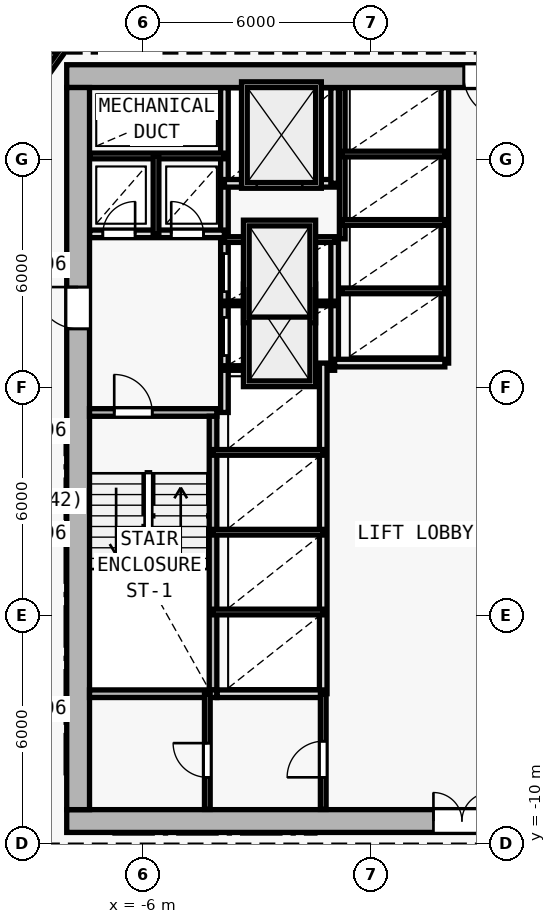
"""IFC4 building model, lengths in metres.
Left out: names, types, materials, properties, quantities, classifications, styles, units other than length and angle.
Written with IfcOpenShell. Run it as: python <this file> out.ifc"""

import sys

from ifc_helpers import new_model, si_unit, direction, frame, frame_2d, origin, origin_2d, place, context, subcontext, project, spatial, rectangle, i_section, extrude, element, fill, save


model = new_model("IFC4")
c1 = context("Model", 3, precision=1e-05, world=origin(), true_north=direction((0.0, 1.0)))
c2 = subcontext(c1, "Body", "Model", "MODEL_VIEW")
j1 = project(units=[si_unit("LENGTHUNIT", "METRE"), si_unit("PLANEANGLEUNIT", "RADIAN")], contexts=[c1])
p1 = place(None, origin())
s1 = spatial("IfcSite", under=j1, at=p1, CompositionType="ELEMENT")
p2 = place(p1, origin())
s2 = spatial("IfcBuilding", under=s1, at=p2, CompositionType="ELEMENT")
p3 = place(p2, frame((0.0, 0.0, 33.6)))
s3 = spatial("IfcBuildingStorey", under=s2, at=p3, CompositionType="ELEMENT", Elevation=33.6)
for number, where, z_axis, x_axis in (
    (1, (-7.7, -9.4, 0.0), (0.0, 0.0, 1.0), (1.0, 0.0, 0.0)),
    (2, (-7.7, 10.2, 0.0), (0.0, 0.0, 1.0), (1.0, 0.0, 0.0)),
    (3, (0.0, -9.4, 0.0), (0.0, 0.0, 1.0), (1.0, 0.0, 0.0)),
    (4, (-7.7, 2.0, 0.0), (0.0, 0.0, 1.0), (1.0, 0.0, 0.0)),
):
    element("IfcColumn", number, at=place(p3, frame(where, z_axis=z_axis, x_axis=x_axis)), inside=s3, PredefinedType="COLUMN", context=c2, shape_type="SweptSolid", body=[
        extrude(i_section(OverallWidth=0.416, OverallDepth=0.446, WebThickness=0.025, FlangeThickness=0.04, FilletRadius=0.015, at=origin_2d()), origin(), (0.0, 0.0, 1.0), 3.6),
    ])
p4 = place(p3, frame((-8.0, -9.4, 0.0), z_axis=(0.0, 0.0, 1.0), x_axis=(1.0, 0.0, 0.0)))
e5 = element("IfcWall", 5, at=p4, inside=s3, PredefinedType="SHEAR", context=c2, shape_type="SweptSolid", body=[
    extrude(rectangle(XDim=16.0, YDim=0.6, at=frame_2d((8.0, 0.0))), origin(), (0.0, 0.0, 1.0), 3.35),
])
p5 = place(p4, frame((9.65, 0.0, 0.0)))
e6 = element("IfcOpeningElement", 6, at=p5, cuts=e5, PredefinedType="OPENING", context=c2, shape_type="SweptSolid", body=[
    extrude(rectangle(XDim=1.5, YDim=2.2, at=frame_2d((0.75, 1.1))), frame((0.0, 0.31, 0.0), z_axis=(0.0, -1.0, 0.0), x_axis=(1.0, 0.0, 0.0)), (0.0, 0.0, 1.0), 0.62),
])
p6 = place(p3, frame((8.0, 10.2, 0.0), z_axis=(0.0, 0.0, 1.0), x_axis=(-1.0, 0.0, 0.0)))
e7 = element("IfcWall", 7, at=p6, inside=s3, PredefinedType="SHEAR", context=c2, shape_type="SweptSolid", body=[
    extrude(rectangle(XDim=16.0, YDim=0.6, at=frame_2d((8.0, 0.0))), origin(), (0.0, 0.0, 1.0), 3.35),
])
p7 = place(p6, frame((4.45, 0.0, 0.0)))
e8 = element("IfcOpeningElement", 8, at=p7, cuts=e7, PredefinedType="OPENING", context=c2, shape_type="SweptSolid", body=[
    extrude(rectangle(XDim=1.1, YDim=2.15, at=frame_2d((0.55, 1.075))), frame((0.0, 0.31, 0.0), z_axis=(0.0, -1.0, 0.0), x_axis=(1.0, 0.0, 0.0)), (0.0, 0.0, 1.0), 0.62),
])
p8 = place(p3, frame((-7.7, -9.1, 0.0), z_axis=(0.0, 0.0, 1.0), x_axis=(0.0, 1.0, 0.0)))
e9 = element("IfcWall", 9, at=p8, inside=s3, PredefinedType="SHEAR", context=c2, shape_type="SweptSolid", body=[
    extrude(rectangle(XDim=19.0, YDim=0.6, at=frame_2d((9.5, 0.0))), origin(), (0.0, 0.0, 1.0), 3.35),
])
p9 = place(p8, frame((12.65, 0.0, 0.0)))
e10 = element("IfcOpeningElement", 10, at=p9, cuts=e9, PredefinedType="OPENING", context=c2, shape_type="SweptSolid", body=[
    extrude(rectangle(XDim=1.1, YDim=2.15, at=frame_2d((0.55, 1.075))), frame((0.0, 0.31, 0.0), z_axis=(0.0, -1.0, 0.0), x_axis=(1.0, 0.0, 0.0)), (0.0, 0.0, 1.0), 0.62),
])
p10 = place(p3, frame((-7.4, 1.35, 0.0), z_axis=(0.0, 0.0, 1.0), x_axis=(1.0, 0.0, 0.0)))
e11 = element("IfcWall", 11, at=p10, inside=s3, PredefinedType="SOLIDWALL", context=c2, shape_type="SweptSolid", body=[
    extrude(rectangle(XDim=3.35, YDim=0.2, at=frame_2d((1.675, 0.0))), origin(), (0.0, 0.0, 1.0), 3.35),
])
p11 = place(p10, frame((0.65, 0.0, 0.0)))
e12 = element("IfcOpeningElement", 12, at=p11, cuts=e11, PredefinedType="OPENING", context=c2, shape_type="SweptSolid", body=[
    extrude(rectangle(XDim=1.0, YDim=2.15, at=frame_2d((0.5, 1.075))), frame((0.0, 0.11, 0.0), z_axis=(0.0, -1.0, 0.0), x_axis=(1.0, 0.0, 0.0)), (0.0, 0.0, 1.0), 0.22),
])
p12 = place(p3, frame((-4.15, -5.95, 0.0), z_axis=(0.0, 0.0, 1.0), x_axis=(0.0, 1.0, 0.0)))
e13 = element("IfcWall", 13, at=p12, inside=s3, PredefinedType="SOLIDWALL", context=c2, shape_type="SweptSolid", body=[
    extrude(rectangle(XDim=7.2, YDim=0.2, at=frame_2d((3.6, 0.0))), origin(), (0.0, 0.0, 1.0), 3.35),
])
p13 = place(p3, frame((-3.85, 1.35, 0.0), z_axis=(0.0, 0.0, 1.0), x_axis=(0.0, 1.0, 0.0)))
e14 = element("IfcWall", 14, at=p13, inside=s3, PredefinedType="SOLIDWALL", context=c2, shape_type="SweptSolid", body=[
    extrude(rectangle(XDim=8.545, YDim=0.2, at=frame_2d((4.272, 0.0))), origin(), (0.0, 0.0, 1.0), 3.35),
])
p14 = place(p13, frame((1.5, 0.0, 0.0)))
e15 = element("IfcOpeningElement", 15, at=p14, cuts=e14, PredefinedType="OPENING", context=c2, shape_type="SweptSolid", body=[
    extrude(rectangle(XDim=1.0, YDim=2.15, at=frame_2d((0.5, 1.075))), frame((0.0, 0.11, 0.0), z_axis=(0.0, -1.0, 0.0), x_axis=(1.0, 0.0, 0.0)), (0.0, 0.0, 1.0), 0.22),
])
p15 = place(p13, frame((3.18, 0.0, 0.0)))
e16 = element("IfcOpeningElement", 16, at=p15, cuts=e14, PredefinedType="OPENING", context=c2, shape_type="SweptSolid", body=[
    extrude(rectangle(XDim=1.0, YDim=2.15, at=frame_2d((0.5, 1.075))), frame((0.0, 0.11, 0.0), z_axis=(0.0, -1.0, 0.0), x_axis=(1.0, 0.0, 0.0)), (0.0, 0.0, 1.0), 0.22),
])
p16 = place(p3, frame((-7.395, 6.05, 0.0), z_axis=(0.0, 0.0, 1.0), x_axis=(1.0, 0.0, 0.0)))
e17 = element("IfcWall", 17, at=p16, inside=s3, PredefinedType="SOLIDWALL", context=c2, shape_type="SweptSolid", body=[
    extrude(rectangle(XDim=3.545, YDim=0.2, at=frame_2d((1.772, 0.0))), origin(), (0.0, 0.0, 1.0), 3.35),
])
p17 = place(p16, frame((0.345, 0.0, 0.0)))
e18 = element("IfcOpeningElement", 18, at=p17, cuts=e17, PredefinedType="OPENING", context=c2, shape_type="SweptSolid", body=[
    extrude(rectangle(XDim=0.85, YDim=2.1, at=frame_2d((0.425, 1.05))), frame((0.0, 0.11, 0.0), z_axis=(0.0, -1.0, 0.0), x_axis=(1.0, 0.0, 0.0)), (0.0, 0.0, 1.0), 0.22),
])
p18 = place(p16, frame((2.145, 0.0, 0.0)))
e19 = element("IfcOpeningElement", 19, at=p18, cuts=e17, PredefinedType="OPENING", context=c2, shape_type="SweptSolid", body=[
    extrude(rectangle(XDim=0.85, YDim=2.1, at=frame_2d((0.425, 1.05))), frame((0.0, 0.11, 0.0), z_axis=(0.0, -1.0, 0.0), x_axis=(1.0, 0.0, 0.0)), (0.0, 0.0, 1.0), 0.22),
])
p19 = place(p3, frame((-7.395, 8.1, 0.0), z_axis=(0.0, 0.0, 1.0), x_axis=(1.0, 0.0, 0.0)))
e20 = element("IfcWall", 20, at=p19, inside=s3, PredefinedType="PARTITIONING", context=c2, shape_type="SweptSolid", body=[
    extrude(rectangle(XDim=3.545, YDim=0.15, at=frame_2d((1.772, 0.0))), origin(), (0.0, 0.0, 1.0), 3.35),
])
p20 = place(p3, frame((-5.65, 6.05, 0.0), z_axis=(0.0, 0.0, 1.0), x_axis=(0.0, 1.0, 0.0)))
e21 = element("IfcWall", 21, at=p20, inside=s3, PredefinedType="PARTITIONING", context=c2, shape_type="SweptSolid", body=[
    extrude(rectangle(XDim=2.05, YDim=0.15, at=frame_2d((1.025, 0.0))), origin(), (0.0, 0.0, 1.0), 3.35),
])
p21 = place(p3, frame((-0.95, 2.65, 0.0), z_axis=(0.0, 0.0, 1.0), x_axis=(0.0, 1.0, 0.0)))
e22 = element("IfcWall", 22, at=p21, inside=s3, PredefinedType="SOLIDWALL", context=c2, shape_type="SweptSolid", body=[
    extrude(rectangle(XDim=3.27, YDim=0.2, at=frame_2d((1.635, 0.0))), origin(), (0.0, 0.0, 1.0), 3.35),
])
for number, where, z_axis, x_axis in (
    (23, (-3.85, 2.52, 0.0), (0.0, 0.0, 1.0), (1.0, 0.0, 0.0)),
    (24, (-3.85, 4.22, 0.0), (0.0, 0.0, 1.0), (1.0, 0.0, 0.0)),
):
    element("IfcWall", number, at=place(p3, frame(where, z_axis=z_axis, x_axis=x_axis)), inside=s3, PredefinedType="PARTITIONING", context=c2, shape_type="SweptSolid", body=[
        extrude(rectangle(XDim=2.9, YDim=0.12, at=frame_2d((1.45, 0.0))), origin(), (0.0, 0.0, 1.0), 3.35),
    ])
p22 = place(p3, frame((-3.85, 5.9, 0.0), z_axis=(0.0, 0.0, 1.0), x_axis=(1.0, 0.0, 0.0)))
e25 = element("IfcWall", 25, at=p22, inside=s3, PredefinedType="PARTITIONING", context=c2, shape_type="SweptSolid", body=[
    extrude(rectangle(XDim=2.9, YDim=0.15, at=frame_2d((1.45, 0.0))), origin(), (0.0, 0.0, 1.0), 3.35),
])
p23 = place(p3, frame((-3.85, 7.38, 0.0), z_axis=(0.0, 0.0, 1.0), x_axis=(1.0, 0.0, 0.0)))
e26 = element("IfcWall", 26, at=p23, inside=s3, PredefinedType="SOLIDWALL", context=c2, shape_type="SweptSolid", body=[
    extrude(rectangle(XDim=2.9, YDim=0.2, at=frame_2d((1.45, 0.0))), origin(), (0.0, 0.0, 1.0), 3.35),
])
p24 = place(p23, frame((0.85, 0.0, 0.0)))
e27 = element("IfcOpeningElement", 27, at=p24, cuts=e26, PredefinedType="OPENING", context=c2, shape_type="SweptSolid", body=[
    extrude(rectangle(XDim=1.2, YDim=2.2, at=frame_2d((0.6, 1.1))), frame((0.0, 0.11, 0.0), z_axis=(0.0, -1.0, 0.0), x_axis=(1.0, 0.0, 0.0)), (0.0, 0.0, 1.0), 0.22),
])
p25 = place(p3, frame((-0.95, 7.38, 0.0), z_axis=(0.0, 0.0, 1.0), x_axis=(0.0, 1.0, 0.0)))
e28 = element("IfcWall", 28, at=p25, inside=s3, PredefinedType="SOLIDWALL", context=c2, shape_type="SweptSolid", body=[
    extrude(rectangle(XDim=2.515, YDim=0.2, at=frame_2d((1.258, 0.0))), origin(), (0.0, 0.0, 1.0), 3.35),
])
p26 = place(p3, frame((-1.25, -6.05, 0.0), z_axis=(0.0, 0.0, 1.0), x_axis=(0.0, 1.0, 0.0)))
e29 = element("IfcWall", 29, at=p26, inside=s3, PredefinedType="SOLIDWALL", context=c2, shape_type="SweptSolid", body=[
    extrude(rectangle(XDim=8.7, YDim=0.2, at=frame_2d((4.35, 0.0))), origin(), (0.0, 0.0, 1.0), 3.35),
])
for number, where, z_axis, x_axis in (
    (30, (-4.15, -3.9, 0.0), (0.0, 0.0, 1.0), (1.0, 0.0, 0.0)),
    (31, (-4.15, -1.8, 0.0), (0.0, 0.0, 1.0), (1.0, 0.0, 0.0)),
    (32, (-4.15, 0.3, 0.0), (0.0, 0.0, 1.0), (1.0, 0.0, 0.0)),
):
    element("IfcWall", number, at=place(p3, frame(where, z_axis=z_axis, x_axis=x_axis)), inside=s3, PredefinedType="PARTITIONING", context=c2, shape_type="SweptSolid", body=[
        extrude(rectangle(XDim=2.9, YDim=0.15, at=frame_2d((1.45, 0.0))), origin(), (0.0, 0.0, 1.0), 3.35),
    ])
p27 = place(p3, frame((1.95, 2.65, 0.0), z_axis=(0.0, 0.0, 1.0), x_axis=(0.0, 1.0, 0.0)))
e33 = element("IfcWall", 33, at=p27, inside=s3, PredefinedType="SOLIDWALL", context=c2, shape_type="SweptSolid", body=[
    extrude(rectangle(XDim=7.245, YDim=0.2, at=frame_2d((3.623, 0.0))), origin(), (0.0, 0.0, 1.0), 3.35),
])
p28 = place(p3, frame((-0.95, 2.65, 0.0), z_axis=(0.0, 0.0, 1.0), x_axis=(1.0, 0.0, 0.0)))
e34 = element("IfcWall", 34, at=p28, inside=s3, PredefinedType="SOLIDWALL", context=c2, shape_type="SweptSolid", body=[
    extrude(rectangle(XDim=2.9, YDim=0.2, at=frame_2d((1.45, 0.0))), origin(), (0.0, 0.0, 1.0), 3.35),
])
p29 = place(p3, frame((-0.75, 5.92, 0.0), z_axis=(0.0, 0.0, 1.0), x_axis=(0.0, 1.0, 0.0)))
e35 = element("IfcWall", 35, at=p29, inside=s3, PredefinedType="PARTITIONING", context=c2, shape_type="SweptSolid", body=[
    extrude(rectangle(XDim=3.975, YDim=0.15, at=frame_2d((1.988, 0.0))), origin(), (0.0, 0.0, 1.0), 3.35),
])
for number, where, z_axis, x_axis in (
    (36, (-0.75, 4.55, 0.0), (0.0, 0.0, 1.0), (1.0, 0.0, 0.0)),
    (37, (-0.75, 6.35, 0.0), (0.0, 0.0, 1.0), (1.0, 0.0, 0.0)),
    (38, (-0.75, 8.15, 0.0), (0.0, 0.0, 1.0), (1.0, 0.0, 0.0)),
):
    element("IfcWall", number, at=place(p3, frame(where, z_axis=z_axis, x_axis=x_axis)), inside=s3, PredefinedType="PARTITIONING", context=c2, shape_type="SweptSolid", body=[
        extrude(rectangle(XDim=2.7, YDim=0.15, at=frame_2d((1.35, 0.0))), origin(), (0.0, 0.0, 1.0), 3.35),
    ])
p30 = place(p3, frame((-7.4, -6.05, 0.0), z_axis=(0.0, 0.0, 1.0), x_axis=(1.0, 0.0, 0.0)))
e39 = element("IfcWall", 39, at=p30, inside=s3, PredefinedType="SOLIDWALL", context=c2, shape_type="SweptSolid", body=[
    extrude(rectangle(XDim=3.35, YDim=0.2, at=frame_2d((1.675, 0.0))), origin(), (0.0, 0.0, 1.0), 3.35),
])
p31 = place(p3, frame((-4.04, -6.05, 0.0), z_axis=(0.0, 0.0, 1.0), x_axis=(1.0, 0.0, 0.0)))
e40 = element("IfcWall", 40, at=p31, inside=s3, PredefinedType="SOLIDWALL", context=c2, shape_type="SweptSolid", body=[
    extrude(rectangle(XDim=2.79, YDim=0.2, at=frame_2d((1.395, 0.0))), origin(), (0.0, 0.0, 1.0), 3.35),
])
p32 = place(p3, frame((-1.25, -9.095, 0.0), z_axis=(0.0, 0.0, 1.0), x_axis=(0.0, 1.0, 0.0)))
e41 = element("IfcWall", 41, at=p32, inside=s3, PredefinedType="PARTITIONING", context=c2, shape_type="SweptSolid", body=[
    extrude(rectangle(XDim=3.045, YDim=0.15, at=frame_2d((1.522, 0.0))), origin(), (0.0, 0.0, 1.0), 3.35),
])
p33 = place(p32, frame((0.845, 0.0, 0.0)))
e42 = element("IfcOpeningElement", 42, at=p33, cuts=e41, PredefinedType="OPENING", context=c2, shape_type="SweptSolid", body=[
    extrude(rectangle(XDim=0.95, YDim=2.1, at=frame_2d((0.475, 1.05))), frame((0.0, 0.085, 0.0), z_axis=(0.0, -1.0, 0.0), x_axis=(1.0, 0.0, 0.0)), (0.0, 0.0, 1.0), 0.17),
])
p34 = place(p3, frame((-4.3, -9.095, 0.0), z_axis=(0.0, 0.0, 1.0), x_axis=(0.0, 1.0, 0.0)))
e43 = element("IfcWall", 43, at=p34, inside=s3, PredefinedType="PARTITIONING", context=c2, shape_type="SweptSolid", body=[
    extrude(rectangle(XDim=3.045, YDim=0.15, at=frame_2d((1.522, 0.0))), origin(), (0.0, 0.0, 1.0), 3.35),
])
p35 = place(p34, frame((0.845, 0.0, 0.0)))
e44 = element("IfcOpeningElement", 44, at=p35, cuts=e43, PredefinedType="OPENING", context=c2, shape_type="SweptSolid", body=[
    extrude(rectangle(XDim=0.9, YDim=2.1, at=frame_2d((0.45, 1.05))), frame((0.0, 0.085, 0.0), z_axis=(0.0, -1.0, 0.0), x_axis=(1.0, 0.0, 0.0)), (0.0, 0.0, 1.0), 0.17),
])
p36 = place(p3, frame((-9.86, 8.426, 0.0), z_axis=(0.0, 0.0, 1.0), x_axis=(0.582449511476, 0.812866881218, 0.0)))
e45 = element("IfcWall", 45, at=p36, inside=s3, PredefinedType="PARTITIONING", context=c2, shape_type="SweptSolid", body=[
    extrude(rectangle(XDim=4.84, YDim=0.15, at=frame_2d((2.42, 0.0))), origin(), (0.0, 0.0, 1.0), 2.725),
])
p37 = place(p36, frame((3.035, 0.0, 0.0)))
e46 = element("IfcOpeningElement", 46, at=p37, cuts=e45, PredefinedType="OPENING", context=c2, shape_type="SweptSolid", body=[
    extrude(rectangle(XDim=0.9, YDim=2.1, at=frame_2d((0.45, 1.05))), frame((0.0, 0.085, 0.0), z_axis=(0.0, -1.0, 0.0), x_axis=(1.0, 0.0, 0.0)), (0.0, 0.0, 1.0), 0.17),
])
p38 = place(p5, origin())
e47 = element("IfcDoor", 47, at=p38, inside=s3, OperationType="DOUBLE_DOOR_SINGLE_SWING", PredefinedType="DOOR", context=c2, shape_type="SweptSolid", body=[
    extrude(rectangle(XDim=1.5, YDim=2.2, at=frame_2d((0.75, 1.1))), frame((0.0, 0.025, 0.0), z_axis=(0.0, -1.0, 0.0), x_axis=(1.0, 0.0, 0.0)), (0.0, 0.0, 1.0), 0.05),
])
fill(e6, e47)
p39 = place(p9, origin())
e48 = element("IfcDoor", 48, at=p39, inside=s3, OperationType="SINGLE_SWING_RIGHT", PredefinedType="DOOR", context=c2, shape_type="SweptSolid", body=[
    extrude(rectangle(XDim=1.1, YDim=2.15, at=frame_2d((0.55, 1.075))), frame((0.0, 0.025, 0.0), z_axis=(0.0, -1.0, 0.0), x_axis=(1.0, 0.0, 0.0)), (0.0, 0.0, 1.0), 0.05),
])
fill(e10, e48)
p40 = place(p7, origin())
e49 = element("IfcDoor", 49, at=p40, inside=s3, OperationType="SINGLE_SWING_LEFT", PredefinedType="DOOR", context=c2, shape_type="SweptSolid", body=[
    extrude(rectangle(XDim=1.1, YDim=2.15, at=frame_2d((0.55, 1.075))), frame((0.0, 0.025, 0.0), z_axis=(0.0, -1.0, 0.0), x_axis=(1.0, 0.0, 0.0)), (0.0, 0.0, 1.0), 0.05),
])
fill(e8, e49)
p41 = place(p11, origin())
e50 = element("IfcDoor", 50, at=p41, inside=s3, OperationType="SINGLE_SWING_LEFT", PredefinedType="DOOR", context=c2, shape_type="SweptSolid", body=[
    extrude(rectangle(XDim=1.0, YDim=2.15, at=frame_2d((0.5, 1.075))), frame((0.0, 0.025, 0.0), z_axis=(0.0, -1.0, 0.0), x_axis=(1.0, 0.0, 0.0)), (0.0, 0.0, 1.0), 0.05),
])
fill(e12, e50)
p42 = place(p17, origin())
e51 = element("IfcDoor", 51, at=p42, inside=s3, OperationType="SINGLE_SWING_RIGHT", PredefinedType="DOOR", context=c2, shape_type="SweptSolid", body=[
    extrude(rectangle(XDim=0.85, YDim=2.1, at=frame_2d((0.425, 1.05))), frame((0.0, 0.025, 0.0), z_axis=(0.0, -1.0, 0.0), x_axis=(1.0, 0.0, 0.0)), (0.0, 0.0, 1.0), 0.05),
])
fill(e18, e51)
p43 = place(p18, origin())
e52 = element("IfcDoor", 52, at=p43, inside=s3, OperationType="SINGLE_SWING_LEFT", PredefinedType="DOOR", context=c2, shape_type="SweptSolid", body=[
    extrude(rectangle(XDim=0.85, YDim=2.1, at=frame_2d((0.425, 1.05))), frame((0.0, 0.025, 0.0), z_axis=(0.0, -1.0, 0.0), x_axis=(1.0, 0.0, 0.0)), (0.0, 0.0, 1.0), 0.05),
])
fill(e19, e52)
p44 = place(p24, origin())
e53 = element("IfcDoor", 53, at=p44, inside=s3, OperationType="DOUBLE_DOOR_SLIDING", PredefinedType="DOOR", context=c2, shape_type="SweptSolid", body=[
    extrude(rectangle(XDim=1.2, YDim=2.2, at=frame_2d((0.6, 1.1))), frame((0.0, 0.025, 0.0), z_axis=(0.0, -1.0, 0.0), x_axis=(1.0, 0.0, 0.0)), (0.0, 0.0, 1.0), 0.05),
])
fill(e27, e53)
p45 = place(p14, origin())
e54 = element("IfcDoor", 54, at=p45, inside=s3, OperationType="DOUBLE_DOOR_SLIDING", PredefinedType="DOOR", context=c2, shape_type="SweptSolid", body=[
    extrude(rectangle(XDim=1.0, YDim=2.15, at=frame_2d((0.5, 1.075))), frame((0.0, 0.025, 0.0), z_axis=(0.0, -1.0, 0.0), x_axis=(1.0, 0.0, 0.0)), (0.0, 0.0, 1.0), 0.05),
])
fill(e15, e54)
p46 = place(p15, origin())
e55 = element("IfcDoor", 55, at=p46, inside=s3, OperationType="DOUBLE_DOOR_SLIDING", PredefinedType="DOOR", context=c2, shape_type="SweptSolid", body=[
    extrude(rectangle(XDim=1.0, YDim=2.15, at=frame_2d((0.5, 1.075))), frame((0.0, 0.025, 0.0), z_axis=(0.0, -1.0, 0.0), x_axis=(1.0, 0.0, 0.0)), (0.0, 0.0, 1.0), 0.05),
])
fill(e16, e55)
p47 = place(p33, origin())
e56 = element("IfcDoor", 56, at=p47, inside=s3, OperationType="SINGLE_SWING_LEFT", PredefinedType="DOOR", context=c2, shape_type="SweptSolid", body=[
    extrude(rectangle(XDim=0.95, YDim=2.1, at=frame_2d((0.475, 1.05))), frame((0.0, 0.025, 0.0), z_axis=(0.0, -1.0, 0.0), x_axis=(1.0, 0.0, 0.0)), (0.0, 0.0, 1.0), 0.05),
])
fill(e42, e56)
p48 = place(p35, origin())
e57 = element("IfcDoor", 57, at=p48, inside=s3, OperationType="SINGLE_SWING_RIGHT", PredefinedType="DOOR", context=c2, shape_type="SweptSolid", body=[
    extrude(rectangle(XDim=0.9, YDim=2.1, at=frame_2d((0.45, 1.05))), frame((0.0, 0.025, 0.0), z_axis=(0.0, -1.0, 0.0), x_axis=(1.0, 0.0, 0.0)), (0.0, 0.0, 1.0), 0.05),
])
fill(e44, e57)
save(model, sys.argv[1])
